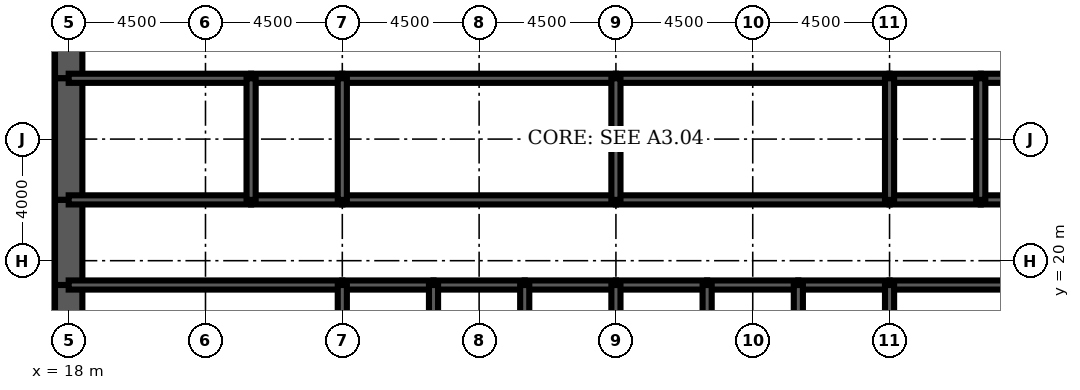
"""IFC4 building model, lengths in metres.
Left out: names, types, materials, properties, quantities, classifications, styles, units other than length and angle.
Written with IfcOpenShell. Run it as: python <this file> out.ifc"""

import sys

from ifc_helpers import new_model, si_unit, direction, frame, frame_2d, origin, place, context, subcontext, project, spatial, rectangle, extrude, element, fill, save


model = new_model("IFC4")
c1 = context("Model", 3, precision=1e-05, world=origin(), true_north=direction((0.0, 1.0)))
c2 = subcontext(c1, "Body", "Model", "MODEL_VIEW")
j1 = project(units=[si_unit("LENGTHUNIT", "METRE"), si_unit("PLANEANGLEUNIT", "RADIAN")], contexts=[c1])
p1 = place(None, origin())
s1 = spatial("IfcSite", under=j1, at=p1, CompositionType="ELEMENT")
p2 = place(p1, origin())
s2 = spatial("IfcBuilding", under=s1, at=p2, CompositionType="ELEMENT")
p3 = place(p2, frame((0.0, 0.0, 13.0)))
s3 = spatial("IfcBuildingStorey", under=s2, at=p3, CompositionType="ELEMENT", Elevation=13.0)
p4 = place(p3, frame((18.0, 28.8, 0.0), z_axis=(0.0, 0.0, 1.0), x_axis=(0.0, -1.0, 0.0)))
e1 = element("IfcWall", 1, at=p4, inside=s3, PredefinedType="SHEAR", context=c2, shape_type="SweptSolid", body=[
    extrude(rectangle(XDim=2.8, YDim=0.9, at=frame_2d((1.4, 0.0))), origin(), (0.0, 0.0, 1.0), 5.0),
])
p5 = place(p4, frame((0.4, 0.0, 0.0)))
e2 = element("IfcOpeningElement", 2, at=p5, cuts=e1, PredefinedType="OPENING", context=c2, shape_type="SweptSolid", body=[
    extrude(rectangle(XDim=1.8, YDim=2.1, at=frame_2d((0.9, 1.05))), frame((0.0, 0.46, 0.0), z_axis=(0.0, -1.0, 0.0), x_axis=(1.0, 0.0, 0.0)), (0.0, 0.0, 1.0), 0.92),
])
p6 = place(p3, frame((18.0, 26.0, 0.0), z_axis=(0.0, 0.0, 1.0), x_axis=(0.0, -1.0, 0.0)))
e3 = element("IfcWall", 3, at=p6, inside=s3, PredefinedType="SHEAR", context=c2, shape_type="SweptSolid", body=[
    extrude(rectangle(XDim=4.0, YDim=0.9, at=frame_2d((2.0, 0.0))), origin(), (0.0, 0.0, 1.0), 5.0),
])
p7 = place(p3, frame((18.0, 22.0, 0.0), z_axis=(0.0, 0.0, 1.0), x_axis=(0.0, -1.0, 0.0)))
e4 = element("IfcWall", 4, at=p7, inside=s3, PredefinedType="SHEAR", context=c2, shape_type="SweptSolid", body=[
    extrude(rectangle(XDim=2.8, YDim=0.9, at=frame_2d((1.4, 0.0))), origin(), (0.0, 0.0, 1.0), 5.0),
])
p8 = place(p7, frame((0.6, 0.0, 0.0)))
e5 = element("IfcOpeningElement", 5, at=p8, cuts=e4, PredefinedType="OPENING", context=c2, shape_type="SweptSolid", body=[
    extrude(rectangle(XDim=1.8, YDim=2.1, at=frame_2d((0.9, 1.05))), frame((0.0, 0.46, 0.0), z_axis=(0.0, -1.0, 0.0), x_axis=(1.0, 0.0, 0.0)), (0.0, 0.0, 1.0), 0.92),
])
p9 = place(p3, frame((18.0, 19.2, 0.0), z_axis=(0.0, 0.0, 1.0), x_axis=(0.0, -1.0, 0.0)))
e6 = element("IfcWall", 6, at=p9, inside=s3, PredefinedType="SHEAR", context=c2, shape_type="SweptSolid", body=[
    extrude(rectangle(XDim=3.2, YDim=0.9, at=frame_2d((1.6, 0.0))), origin(), (0.0, 0.0, 1.0), 5.0),
])
p10 = place(p3, frame((18.0, 19.2, 0.0), z_axis=(0.0, 0.0, 1.0), x_axis=(1.0, 0.0, 0.0)))
e7 = element("IfcWall", 7, at=p10, inside=s3, PredefinedType="SOLIDWALL", context=c2, shape_type="SweptSolid", body=[
    extrude(rectangle(XDim=9.0, YDim=0.3, at=frame_2d((4.5, 0.0))), origin(), (0.0, 0.0, 1.0), 5.0),
])
p11 = place(p10, frame((0.65, 0.0, 0.0)))
e8 = element("IfcOpeningElement", 8, at=p11, cuts=e7, PredefinedType="OPENING", context=c2, shape_type="SweptSolid", body=[
    extrude(rectangle(XDim=1.0, YDim=2.1, at=frame_2d((0.5, 1.05))), frame((0.0, 0.16, 0.0), z_axis=(0.0, -1.0, 0.0), x_axis=(1.0, 0.0, 0.0)), (0.0, 0.0, 1.0), 0.32),
])
p12 = place(p3, frame((27.0, 19.2, 0.0), z_axis=(0.0, 0.0, 1.0), x_axis=(1.0, 0.0, 0.0)))
e9 = element("IfcWall", 9, at=p12, inside=s3, PredefinedType="SOLIDWALL", context=c2, shape_type="SweptSolid", body=[
    extrude(rectangle(XDim=3.0, YDim=0.3, at=frame_2d((1.5, 0.0))), origin(), (0.0, 0.0, 1.0), 5.0),
])
p13 = place(p12, frame((0.95, 0.0, 0.0)))
e10 = element("IfcOpeningElement", 10, at=p13, cuts=e9, PredefinedType="OPENING", context=c2, shape_type="SweptSolid", body=[
    extrude(rectangle(XDim=1.1, YDim=2.2, at=frame_2d((0.55, 1.1))), frame((0.0, 0.16, 0.0), z_axis=(0.0, -1.0, 0.0), x_axis=(1.0, 0.0, 0.0)), (0.0, 0.0, 1.0), 0.32),
])
p14 = place(p3, frame((30.0, 19.2, 0.0), z_axis=(0.0, 0.0, 1.0), x_axis=(1.0, 0.0, 0.0)))
e11 = element("IfcWall", 11, at=p14, inside=s3, PredefinedType="SOLIDWALL", context=c2, shape_type="SweptSolid", body=[
    extrude(rectangle(XDim=3.0, YDim=0.3, at=frame_2d((1.5, 0.0))), origin(), (0.0, 0.0, 1.0), 5.0),
])
p15 = place(p14, frame((0.95, 0.0, 0.0)))
e12 = element("IfcOpeningElement", 12, at=p15, cuts=e11, PredefinedType="OPENING", context=c2, shape_type="SweptSolid", body=[
    extrude(rectangle(XDim=1.1, YDim=2.2, at=frame_2d((0.55, 1.1))), frame((0.0, 0.16, 0.0), z_axis=(0.0, -1.0, 0.0), x_axis=(1.0, 0.0, 0.0)), (0.0, 0.0, 1.0), 0.32),
])
p16 = place(p3, frame((33.0, 19.2, 0.0), z_axis=(0.0, 0.0, 1.0), x_axis=(1.0, 0.0, 0.0)))
e13 = element("IfcWall", 13, at=p16, inside=s3, PredefinedType="SOLIDWALL", context=c2, shape_type="SweptSolid", body=[
    extrude(rectangle(XDim=3.0, YDim=0.3, at=frame_2d((1.5, 0.0))), origin(), (0.0, 0.0, 1.0), 5.0),
])
p17 = place(p16, frame((0.95, 0.0, 0.0)))
e14 = element("IfcOpeningElement", 14, at=p17, cuts=e13, PredefinedType="OPENING", context=c2, shape_type="SweptSolid", body=[
    extrude(rectangle(XDim=1.1, YDim=2.2, at=frame_2d((0.55, 1.1))), frame((0.0, 0.16, 0.0), z_axis=(0.0, -1.0, 0.0), x_axis=(1.0, 0.0, 0.0)), (0.0, 0.0, 1.0), 0.32),
])
p18 = place(p3, frame((36.0, 19.2, 0.0), z_axis=(0.0, 0.0, 1.0), x_axis=(1.0, 0.0, 0.0)))
e15 = element("IfcWall", 15, at=p18, inside=s3, PredefinedType="SOLIDWALL", context=c2, shape_type="SweptSolid", body=[
    extrude(rectangle(XDim=3.0, YDim=0.3, at=frame_2d((1.5, 0.0))), origin(), (0.0, 0.0, 1.0), 5.0),
])
p19 = place(p18, frame((0.95, 0.0, 0.0)))
e16 = element("IfcOpeningElement", 16, at=p19, cuts=e15, PredefinedType="OPENING", context=c2, shape_type="SweptSolid", body=[
    extrude(rectangle(XDim=1.1, YDim=2.2, at=frame_2d((0.55, 1.1))), frame((0.0, 0.16, 0.0), z_axis=(0.0, -1.0, 0.0), x_axis=(1.0, 0.0, 0.0)), (0.0, 0.0, 1.0), 0.32),
])
for number, where, z_axis, x_axis in (
    (17, (39.0, 19.2, 0.0), (0.0, 0.0, 1.0), (1.0, 0.0, 0.0)),
    (18, (42.0, 19.2, 0.0), (0.0, 0.0, 1.0), (1.0, 0.0, 0.0)),
):
    element("IfcWall", number, at=place(p3, frame(where, z_axis=z_axis, x_axis=x_axis)), inside=s3, PredefinedType="SOLIDWALL", context=c2, shape_type="SweptSolid", body=[
        extrude(rectangle(XDim=3.0, YDim=0.3, at=frame_2d((1.5, 0.0))), origin(), (0.0, 0.0, 1.0), 5.0),
    ])
p20 = place(p3, frame((45.0, 19.2, 0.0), z_axis=(0.0, 0.0, 1.0), x_axis=(1.0, 0.0, 0.0)))
e19 = element("IfcWall", 19, at=p20, inside=s3, PredefinedType="SOLIDWALL", context=c2, shape_type="SweptSolid", body=[
    extrude(rectangle(XDim=9.0, YDim=0.3, at=frame_2d((4.5, 0.0))), origin(), (0.0, 0.0, 1.0), 5.0),
])
p21 = place(p20, frame((7.35, 0.0, 0.0)))
e20 = element("IfcOpeningElement", 20, at=p21, cuts=e19, PredefinedType="OPENING", context=c2, shape_type="SweptSolid", body=[
    extrude(rectangle(XDim=1.0, YDim=2.1, at=frame_2d((0.5, 1.05))), frame((0.0, 0.16, 0.0), z_axis=(0.0, -1.0, 0.0), x_axis=(1.0, 0.0, 0.0)), (0.0, 0.0, 1.0), 0.32),
])
p22 = place(p3, frame((18.0, 22.0, 0.0), z_axis=(0.0, 0.0, 1.0), x_axis=(1.0, 0.0, 0.0)))
e21 = element("IfcWall", 21, at=p22, inside=s3, PredefinedType="SOLIDWALL", context=c2, shape_type="SweptSolid", body=[
    extrude(rectangle(XDim=6.0, YDim=0.3, at=frame_2d((3.0, 0.0))), origin(), (0.0, 0.0, 1.0), 5.0),
])
p23 = place(p22, frame((4.4, 0.0, 0.0)))
e22 = element("IfcOpeningElement", 22, at=p23, cuts=e21, PredefinedType="OPENING", context=c2, shape_type="SweptSolid", body=[
    extrude(rectangle(XDim=1.0, YDim=2.1, at=frame_2d((0.5, 1.05))), frame((0.0, 0.16, 0.0), z_axis=(0.0, -1.0, 0.0), x_axis=(1.0, 0.0, 0.0)), (0.0, 0.0, 1.0), 0.32),
])
p24 = place(p22, frame((0.85, 0.0, 0.0)))
e23 = element("IfcOpeningElement", 23, at=p24, cuts=e21, PredefinedType="OPENING", context=c2, shape_type="SweptSolid", body=[
    extrude(rectangle(XDim=1.0, YDim=2.1, at=frame_2d((0.5, 1.05))), frame((0.0, 0.16, 0.0), z_axis=(0.0, -1.0, 0.0), x_axis=(1.0, 0.0, 0.0)), (0.0, 0.0, 1.0), 0.32),
])
p25 = place(p3, frame((24.0, 22.0, 0.0), z_axis=(0.0, 0.0, 1.0), x_axis=(1.0, 0.0, 0.0)))
e24 = element("IfcWall", 24, at=p25, inside=s3, PredefinedType="SOLIDWALL", context=c2, shape_type="SweptSolid", body=[
    extrude(rectangle(XDim=3.0, YDim=0.3, at=frame_2d((1.5, 0.0))), origin(), (0.0, 0.0, 1.0), 5.0),
])
p26 = place(p25, frame((1.0, 0.0, 0.0)))
e25 = element("IfcOpeningElement", 25, at=p26, cuts=e24, PredefinedType="OPENING", context=c2, shape_type="SweptSolid", body=[
    extrude(rectangle(XDim=1.0, YDim=2.1, at=frame_2d((0.5, 1.05))), frame((0.0, 0.16, 0.0), z_axis=(0.0, -1.0, 0.0), x_axis=(1.0, 0.0, 0.0)), (0.0, 0.0, 1.0), 0.32),
])
p27 = place(p3, frame((27.0, 22.0, 0.0), z_axis=(0.0, 0.0, 1.0), x_axis=(1.0, 0.0, 0.0)))
e26 = element("IfcWall", 26, at=p27, inside=s3, PredefinedType="SOLIDWALL", context=c2, shape_type="SweptSolid", body=[
    extrude(rectangle(XDim=9.0, YDim=0.3, at=frame_2d((4.5, 0.0))), origin(), (0.0, 0.0, 1.0), 5.0),
])
p28 = place(p27, frame((4.0, 0.0, 0.0)))
e27 = element("IfcOpeningElement", 27, at=p28, cuts=e26, PredefinedType="OPENING", context=c2, shape_type="SweptSolid", body=[
    extrude(rectangle(XDim=1.0, YDim=2.1, at=frame_2d((0.5, 1.05))), frame((0.0, 0.16, 0.0), z_axis=(0.0, -1.0, 0.0), x_axis=(1.0, 0.0, 0.0)), (0.0, 0.0, 1.0), 0.32),
])
p29 = place(p3, frame((36.0, 22.0, 0.0), z_axis=(0.0, 0.0, 1.0), x_axis=(1.0, 0.0, 0.0)))
e28 = element("IfcWall", 28, at=p29, inside=s3, PredefinedType="SOLIDWALL", context=c2, shape_type="SweptSolid", body=[
    extrude(rectangle(XDim=9.0, YDim=0.3, at=frame_2d((4.5, 0.0))), origin(), (0.0, 0.0, 1.0), 5.0),
])
p30 = place(p29, frame((4.0, 0.0, 0.0)))
e29 = element("IfcOpeningElement", 29, at=p30, cuts=e28, PredefinedType="OPENING", context=c2, shape_type="SweptSolid", body=[
    extrude(rectangle(XDim=1.0, YDim=2.1, at=frame_2d((0.5, 1.05))), frame((0.0, 0.16, 0.0), z_axis=(0.0, -1.0, 0.0), x_axis=(1.0, 0.0, 0.0)), (0.0, 0.0, 1.0), 0.32),
])
p31 = place(p3, frame((45.0, 22.0, 0.0), z_axis=(0.0, 0.0, 1.0), x_axis=(1.0, 0.0, 0.0)))
e30 = element("IfcWall", 30, at=p31, inside=s3, PredefinedType="SOLIDWALL", context=c2, shape_type="SweptSolid", body=[
    extrude(rectangle(XDim=3.0, YDim=0.3, at=frame_2d((1.5, 0.0))), origin(), (0.0, 0.0, 1.0), 5.0),
])
p32 = place(p31, frame((1.0, 0.0, 0.0)))
e31 = element("IfcOpeningElement", 31, at=p32, cuts=e30, PredefinedType="OPENING", context=c2, shape_type="SweptSolid", body=[
    extrude(rectangle(XDim=1.0, YDim=2.1, at=frame_2d((0.5, 1.05))), frame((0.0, 0.16, 0.0), z_axis=(0.0, -1.0, 0.0), x_axis=(1.0, 0.0, 0.0)), (0.0, 0.0, 1.0), 0.32),
])
p33 = place(p3, frame((48.0, 22.0, 0.0), z_axis=(0.0, 0.0, 1.0), x_axis=(1.0, 0.0, 0.0)))
e32 = element("IfcWall", 32, at=p33, inside=s3, PredefinedType="SOLIDWALL", context=c2, shape_type="SweptSolid", body=[
    extrude(rectangle(XDim=6.0, YDim=0.3, at=frame_2d((3.0, 0.0))), origin(), (0.0, 0.0, 1.0), 5.0),
])
p34 = place(p33, frame((2.0, 0.0, 0.0)))
e33 = element("IfcOpeningElement", 33, at=p34, cuts=e32, PredefinedType="OPENING", context=c2, shape_type="SweptSolid", body=[
    extrude(rectangle(XDim=1.0, YDim=2.1, at=frame_2d((0.5, 1.05))), frame((0.0, 0.16, 0.0), z_axis=(0.0, -1.0, 0.0), x_axis=(1.0, 0.0, 0.0)), (0.0, 0.0, 1.0), 0.32),
])
p35 = place(p33, frame((4.15, 0.0, 0.0)))
e34 = element("IfcOpeningElement", 34, at=p35, cuts=e32, PredefinedType="OPENING", context=c2, shape_type="SweptSolid", body=[
    extrude(rectangle(XDim=1.0, YDim=2.1, at=frame_2d((0.5, 1.05))), frame((0.0, 0.16, 0.0), z_axis=(0.0, -1.0, 0.0), x_axis=(1.0, 0.0, 0.0)), (0.0, 0.0, 1.0), 0.32),
])
p36 = place(p3, frame((18.0, 26.0, 0.0), z_axis=(0.0, 0.0, 1.0), x_axis=(1.0, 0.0, 0.0)))
e35 = element("IfcWall", 35, at=p36, inside=s3, PredefinedType="SOLIDWALL", context=c2, shape_type="SweptSolid", body=[
    extrude(rectangle(XDim=6.0, YDim=0.3, at=frame_2d((3.0, 0.0))), origin(), (0.0, 0.0, 1.0), 5.0),
])
p37 = place(p3, frame((24.0, 26.0, 0.0), z_axis=(0.0, 0.0, 1.0), x_axis=(1.0, 0.0, 0.0)))
e36 = element("IfcWall", 36, at=p37, inside=s3, PredefinedType="SOLIDWALL", context=c2, shape_type="SweptSolid", body=[
    extrude(rectangle(XDim=3.0, YDim=0.3, at=frame_2d((1.5, 0.0))), origin(), (0.0, 0.0, 1.0), 5.0),
])
for number, where, z_axis, x_axis in (
    (37, (27.0, 26.0, 0.0), (0.0, 0.0, 1.0), (1.0, 0.0, 0.0)),
    (38, (36.0, 26.0, 0.0), (0.0, 0.0, 1.0), (1.0, 0.0, 0.0)),
):
    element("IfcWall", number, at=place(p3, frame(where, z_axis=z_axis, x_axis=x_axis)), inside=s3, PredefinedType="SOLIDWALL", context=c2, shape_type="SweptSolid", body=[
        extrude(rectangle(XDim=9.0, YDim=0.3, at=frame_2d((4.5, 0.0))), origin(), (0.0, 0.0, 1.0), 5.0),
    ])
p38 = place(p3, frame((45.0, 26.0, 0.0), z_axis=(0.0, 0.0, 1.0), x_axis=(1.0, 0.0, 0.0)))
e39 = element("IfcWall", 39, at=p38, inside=s3, PredefinedType="SOLIDWALL", context=c2, shape_type="SweptSolid", body=[
    extrude(rectangle(XDim=3.0, YDim=0.3, at=frame_2d((1.5, 0.0))), origin(), (0.0, 0.0, 1.0), 5.0),
])
p39 = place(p3, frame((48.0, 26.0, 0.0), z_axis=(0.0, 0.0, 1.0), x_axis=(1.0, 0.0, 0.0)))
e40 = element("IfcWall", 40, at=p39, inside=s3, PredefinedType="SOLIDWALL", context=c2, shape_type="SweptSolid", body=[
    extrude(rectangle(XDim=6.0, YDim=0.3, at=frame_2d((3.0, 0.0))), origin(), (0.0, 0.0, 1.0), 5.0),
])
for number, where, z_axis, x_axis in (
    (41, (27.0, 16.0, 0.0), (0.0, 0.0, 1.0), (0.0, 1.0, 0.0)),
    (42, (30.0, 16.0, 0.0), (0.0, 0.0, 1.0), (0.0, 1.0, 0.0)),
    (43, (33.0, 16.0, 0.0), (0.0, 0.0, 1.0), (0.0, 1.0, 0.0)),
    (44, (36.0, 16.0, 0.0), (0.0, 0.0, 1.0), (0.0, 1.0, 0.0)),
    (45, (39.0, 16.0, 0.0), (0.0, 0.0, 1.0), (0.0, 1.0, 0.0)),
    (46, (42.0, 16.0, 0.0), (0.0, 0.0, 1.0), (0.0, 1.0, 0.0)),
    (47, (45.0, 16.0, 0.0), (0.0, 0.0, 1.0), (0.0, 1.0, 0.0)),
):
    element("IfcWall", number, at=place(p3, frame(where, z_axis=z_axis, x_axis=x_axis)), inside=s3, PredefinedType="SOLIDWALL", context=c2, shape_type="SweptSolid", body=[
        extrude(rectangle(XDim=3.2, YDim=0.3, at=frame_2d((1.6, 0.0))), origin(), (0.0, 0.0, 1.0), 5.0),
    ])
for number, where, z_axis, x_axis in (
    (48, (24.0, 22.0, 0.0), (0.0, 0.0, 1.0), (0.0, 1.0, 0.0)),
    (49, (27.0, 22.0, 0.0), (0.0, 0.0, 1.0), (0.0, 1.0, 0.0)),
    (50, (36.0, 22.0, 0.0), (0.0, 0.0, 1.0), (0.0, 1.0, 0.0)),
    (51, (45.0, 22.0, 0.0), (0.0, 0.0, 1.0), (0.0, 1.0, 0.0)),
    (52, (48.0, 22.0, 0.0), (0.0, 0.0, 1.0), (0.0, 1.0, 0.0)),
):
    element("IfcWall", number, at=place(p3, frame(where, z_axis=z_axis, x_axis=x_axis)), inside=s3, PredefinedType="SOLIDWALL", context=c2, shape_type="SweptSolid", body=[
        extrude(rectangle(XDim=4.0, YDim=0.3, at=frame_2d((2.0, 0.0))), origin(), (0.0, 0.0, 1.0), 5.0),
    ])
p40 = place(p3, frame((42.0, 22.15, 0.0), z_axis=(0.0, 0.0, 1.0), x_axis=(0.0, 1.0, 0.0)))
e53 = element("IfcWall", 53, at=p40, inside=s3, PredefinedType="PARTITIONING", context=c2, shape_type="SweptSolid", body=[
    extrude(rectangle(XDim=3.7, YDim=0.15, at=frame_2d((1.85, 0.0))), origin(), (0.0, 0.0, 1.0), 3.0),
])
p41 = place(p40, frame((2.2, 0.0, 0.0)))
e54 = element("IfcOpeningElement", 54, at=p41, cuts=e53, PredefinedType="OPENING", context=c2, shape_type="SweptSolid", body=[
    extrude(rectangle(XDim=1.0, YDim=2.1, at=frame_2d((0.5, 1.05))), frame((0.0, 0.085, 0.0), z_axis=(0.0, -1.0, 0.0), x_axis=(1.0, 0.0, 0.0)), (0.0, 0.0, 1.0), 0.17),
])
p42 = place(p3, frame((20.325, 22.15, 0.0), z_axis=(0.0, 0.0, 1.0), x_axis=(0.0, 1.0, 0.0)))
e55 = element("IfcWall", 55, at=p42, inside=s3, PredefinedType="PARTITIONING", context=c2, shape_type="SweptSolid", body=[
    extrude(rectangle(XDim=3.7, YDim=0.15, at=frame_2d((1.85, 0.0))), origin(), (0.0, 0.0, 1.0), 3.0),
])
p43 = place(p3, frame((47.7, 19.35, 0.0), z_axis=(0.0, 0.0, 1.0), x_axis=(0.0, 1.0, 0.0)))
e56 = element("IfcWall", 56, at=p43, inside=s3, PredefinedType="PARTITIONING", context=c2, shape_type="SweptSolid", body=[
    extrude(rectangle(XDim=2.5, YDim=0.15, at=frame_2d((1.25, 0.0))), origin(), (0.0, 0.0, 1.0), 3.0),
])
p44 = place(p43, frame((1.15, 0.0, 0.0)))
e57 = element("IfcOpeningElement", 57, at=p44, cuts=e56, PredefinedType="OPENING", context=c2, shape_type="SweptSolid", body=[
    extrude(rectangle(XDim=1.0, YDim=2.1, at=frame_2d((0.5, 1.05))), frame((0.0, 0.085, 0.0), z_axis=(0.0, -1.0, 0.0), x_axis=(1.0, 0.0, 0.0)), (0.0, 0.0, 1.0), 0.17),
])
p45 = place(p41, origin())
e58 = element("IfcDoor", 58, at=p45, inside=s3, OperationType="SINGLE_SWING_RIGHT", PredefinedType="DOOR", context=c2, shape_type="SweptSolid", body=[
    extrude(rectangle(XDim=1.0, YDim=2.1, at=frame_2d((0.5, 1.05))), frame((0.0, 0.025, 0.0), z_axis=(0.0, -1.0, 0.0), x_axis=(1.0, 0.0, 0.0)), (0.0, 0.0, 1.0), 0.05),
])
fill(e54, e58)
p46 = place(p44, origin())
e59 = element("IfcDoor", 59, at=p46, inside=s3, OperationType="SINGLE_SWING_RIGHT", PredefinedType="DOOR", context=c2, shape_type="SweptSolid", body=[
    extrude(rectangle(XDim=1.0, YDim=2.1, at=frame_2d((0.5, 1.05))), frame((0.0, 0.025, 0.0), z_axis=(0.0, -1.0, 0.0), x_axis=(1.0, 0.0, 0.0)), (0.0, 0.0, 1.0), 0.05),
])
fill(e57, e59)
p47 = place(p13, origin())
e60 = element("IfcDoor", 60, at=p47, inside=s3, OperationType="DOUBLE_DOOR_SLIDING", PredefinedType="USERDEFINED", context=c2, shape_type="SweptSolid", body=[
    extrude(rectangle(XDim=1.1, YDim=2.2, at=frame_2d((0.55, 1.1))), frame((0.0, 0.025, 0.0), z_axis=(0.0, -1.0, 0.0), x_axis=(1.0, 0.0, 0.0)), (0.0, 0.0, 1.0), 0.05),
])
fill(e10, e60)
p48 = place(p15, origin())
e61 = element("IfcDoor", 61, at=p48, inside=s3, OperationType="DOUBLE_DOOR_SLIDING", PredefinedType="USERDEFINED", context=c2, shape_type="SweptSolid", body=[
    extrude(rectangle(XDim=1.1, YDim=2.2, at=frame_2d((0.55, 1.1))), frame((0.0, 0.025, 0.0), z_axis=(0.0, -1.0, 0.0), x_axis=(1.0, 0.0, 0.0)), (0.0, 0.0, 1.0), 0.05),
])
fill(e12, e61)
p49 = place(p17, origin())
e62 = element("IfcDoor", 62, at=p49, inside=s3, OperationType="DOUBLE_DOOR_SLIDING", PredefinedType="USERDEFINED", context=c2, shape_type="SweptSolid", body=[
    extrude(rectangle(XDim=1.1, YDim=2.2, at=frame_2d((0.55, 1.1))), frame((0.0, 0.025, 0.0), z_axis=(0.0, -1.0, 0.0), x_axis=(1.0, 0.0, 0.0)), (0.0, 0.0, 1.0), 0.05),
])
fill(e14, e62)
p50 = place(p19, origin())
e63 = element("IfcDoor", 63, at=p50, inside=s3, OperationType="DOUBLE_DOOR_SLIDING", PredefinedType="USERDEFINED", context=c2, shape_type="SweptSolid", body=[
    extrude(rectangle(XDim=1.1, YDim=2.2, at=frame_2d((0.55, 1.1))), frame((0.0, 0.025, 0.0), z_axis=(0.0, -1.0, 0.0), x_axis=(1.0, 0.0, 0.0)), (0.0, 0.0, 1.0), 0.05),
])
fill(e16, e63)
p51 = place(p11, origin())
e64 = element("IfcDoor", 64, at=p51, inside=s3, OperationType="SINGLE_SWING_LEFT", PredefinedType="DOOR", context=c2, shape_type="SweptSolid", body=[
    extrude(rectangle(XDim=1.0, YDim=2.1, at=frame_2d((0.5, 1.05))), frame((0.0, 0.025, 0.0), z_axis=(0.0, -1.0, 0.0), x_axis=(1.0, 0.0, 0.0)), (0.0, 0.0, 1.0), 0.05),
])
fill(e8, e64)
p52 = place(p8, origin())
e65 = element("IfcDoor", 65, at=p52, inside=s3, OperationType="SINGLE_SWING_LEFT", PredefinedType="DOOR", context=c2, shape_type="SweptSolid", body=[
    extrude(rectangle(XDim=1.8, YDim=2.1, at=frame_2d((0.9, 1.05))), frame((0.0, 0.45, 0.0), z_axis=(0.0, -1.0, 0.0), x_axis=(1.0, 0.0, 0.0)), (0.0, 0.0, 1.0), 0.899),
])
fill(e5, e65)
p53 = place(p5, origin())
e66 = element("IfcDoor", 66, at=p53, inside=s3, OperationType="SINGLE_SWING_LEFT", PredefinedType="DOOR", context=c2, shape_type="SweptSolid", body=[
    extrude(rectangle(XDim=1.8, YDim=2.1, at=frame_2d((0.9, 1.05))), frame((0.0, 0.45, 0.0), z_axis=(0.0, -1.0, 0.0), x_axis=(1.0, 0.0, 0.0)), (0.0, 0.0, 1.0), 0.899),
])
fill(e2, e66)
p54 = place(p23, origin())
e67 = element("IfcDoor", 67, at=p54, inside=s3, OperationType="SINGLE_SWING_RIGHT", PredefinedType="DOOR", context=c2, shape_type="SweptSolid", body=[
    extrude(rectangle(XDim=1.0, YDim=2.1, at=frame_2d((0.5, 1.05))), frame((0.0, 0.025, 0.0), z_axis=(0.0, -1.0, 0.0), x_axis=(1.0, 0.0, 0.0)), (0.0, 0.0, 1.0), 0.05),
])
fill(e22, e67)
p55 = place(p26, origin())
e68 = element("IfcDoor", 68, at=p55, inside=s3, OperationType="SINGLE_SWING_LEFT", PredefinedType="DOOR", context=c2, shape_type="SweptSolid", body=[
    extrude(rectangle(XDim=1.0, YDim=2.1, at=frame_2d((0.5, 1.05))), frame((0.0, 0.025, 0.0), z_axis=(0.0, -1.0, 0.0), x_axis=(1.0, 0.0, 0.0)), (0.0, 0.0, 1.0), 0.05),
])
fill(e25, e68)
p56 = place(p28, origin())
e69 = element("IfcDoor", 69, at=p56, inside=s3, OperationType="SINGLE_SWING_LEFT", PredefinedType="DOOR", context=c2, shape_type="SweptSolid", body=[
    extrude(rectangle(XDim=1.0, YDim=2.1, at=frame_2d((0.5, 1.05))), frame((0.0, 0.025, 0.0), z_axis=(0.0, -1.0, 0.0), x_axis=(1.0, 0.0, 0.0)), (0.0, 0.0, 1.0), 0.05),
])
fill(e27, e69)
p57 = place(p30, origin())
e70 = element("IfcDoor", 70, at=p57, inside=s3, OperationType="SINGLE_SWING_LEFT", PredefinedType="DOOR", context=c2, shape_type="SweptSolid", body=[
    extrude(rectangle(XDim=1.0, YDim=2.1, at=frame_2d((0.5, 1.05))), frame((0.0, 0.025, 0.0), z_axis=(0.0, -1.0, 0.0), x_axis=(1.0, 0.0, 0.0)), (0.0, 0.0, 1.0), 0.05),
])
fill(e29, e70)
p58 = place(p32, origin())
e71 = element("IfcDoor", 71, at=p58, inside=s3, OperationType="SINGLE_SWING_LEFT", PredefinedType="DOOR", context=c2, shape_type="SweptSolid", body=[
    extrude(rectangle(XDim=1.0, YDim=2.1, at=frame_2d((0.5, 1.05))), frame((0.0, 0.025, 0.0), z_axis=(0.0, -1.0, 0.0), x_axis=(1.0, 0.0, 0.0)), (0.0, 0.0, 1.0), 0.05),
])
fill(e31, e71)
p59 = place(p24, origin())
e72 = element("IfcDoor", 72, at=p59, inside=s3, OperationType="SINGLE_SWING_LEFT", PredefinedType="DOOR", context=c2, shape_type="SweptSolid", body=[
    extrude(rectangle(XDim=1.0, YDim=2.1, at=frame_2d((0.5, 1.05))), frame((0.0, 0.025, 0.0), z_axis=(0.0, -1.0, 0.0), x_axis=(1.0, 0.0, 0.0)), (0.0, 0.0, 1.0), 0.05),
])
fill(e23, e72)
save(model, sys.argv[1])
